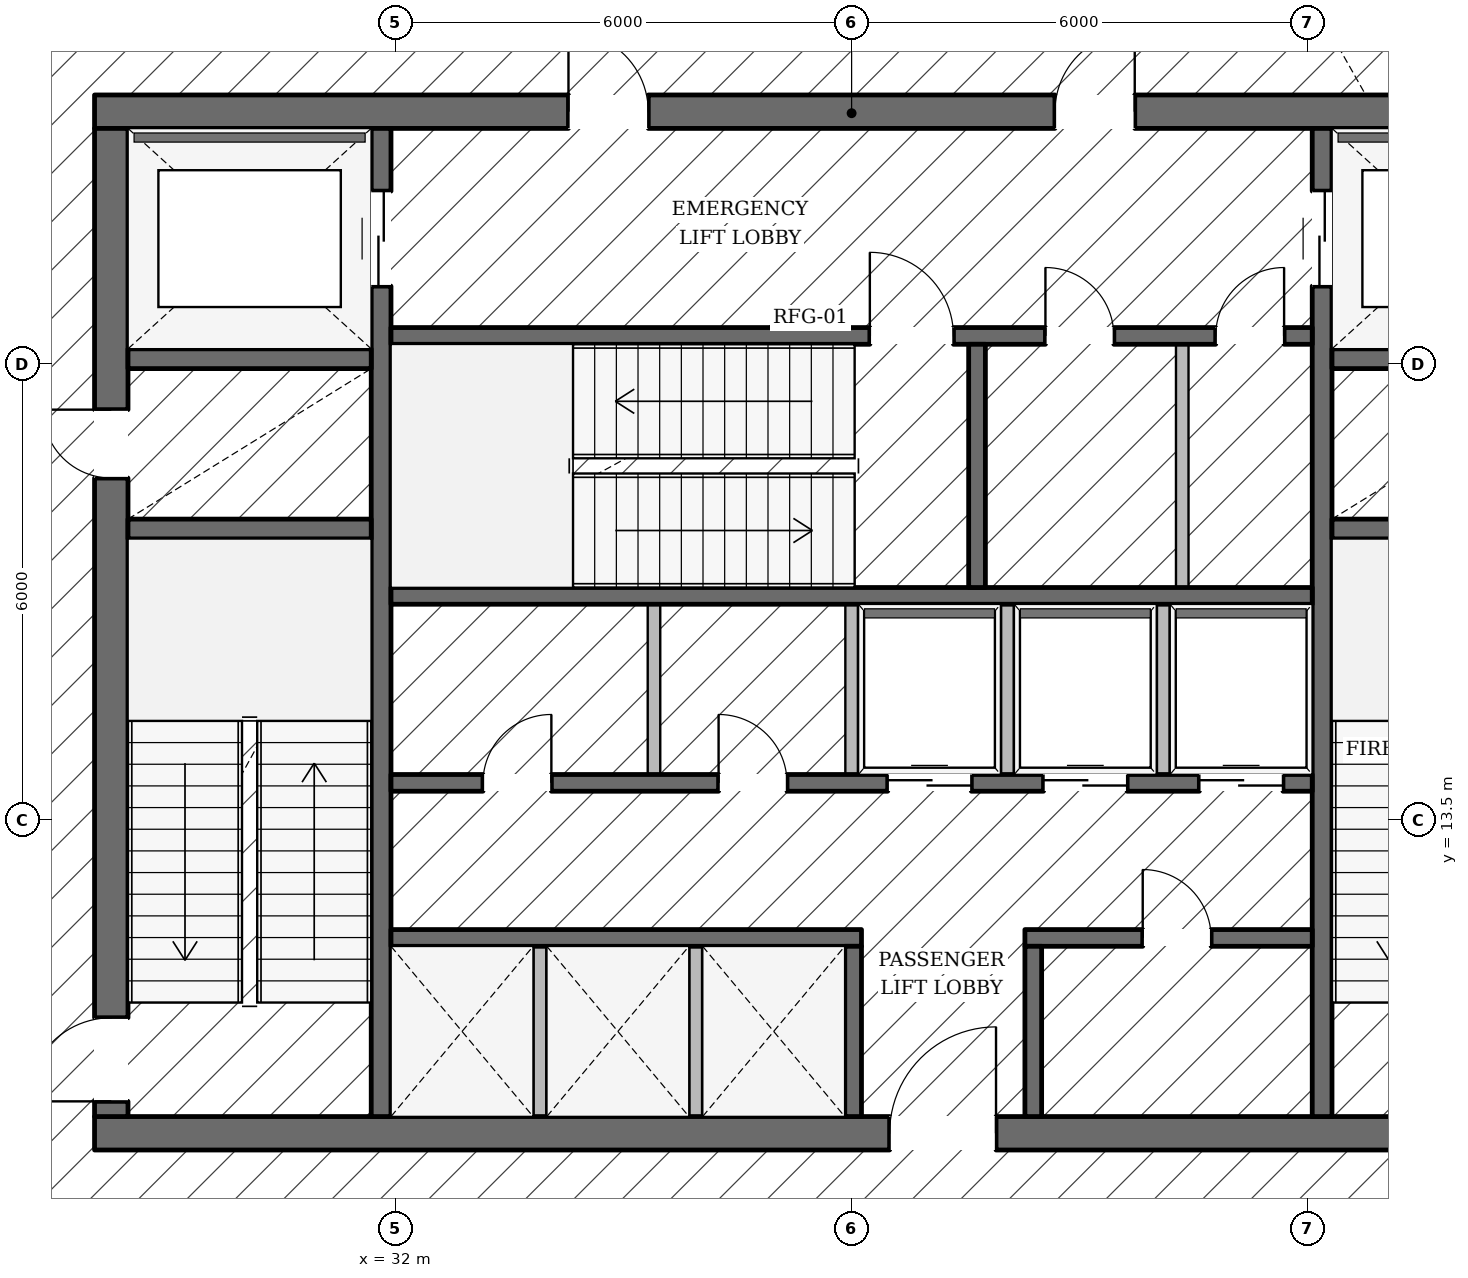
"""IFC4 building model, lengths in metres.
Left out: names, types, materials, properties, quantities, classifications, styles, units other than length and angle.
Written with IfcOpenShell. Run it as: python <this file> out.ifc"""

import sys

from ifc_helpers import new_model, si_unit, direction, frame, frame_2d, origin, place, context, subcontext, project, spatial, rectangle, extrude, element, fill, save


model = new_model("IFC4")
c1 = context("Model", 3, precision=1e-05, world=origin(), true_north=direction((0.0, 1.0)))
c2 = subcontext(c1, "Body", "Model", "MODEL_VIEW")
j1 = project(units=[si_unit("LENGTHUNIT", "METRE"), si_unit("PLANEANGLEUNIT", "RADIAN")], contexts=[c1])
p1 = place(None, origin())
s1 = spatial("IfcSite", under=j1, at=p1, CompositionType="ELEMENT")
p2 = place(p1, origin())
s2 = spatial("IfcBuilding", under=s1, at=p2, CompositionType="ELEMENT")
p3 = place(p2, frame((0.0, 0.0, 154.8)))
s3 = spatial("IfcBuildingStorey", under=s2, at=p3, CompositionType="ELEMENT", Elevation=154.8)
p4 = place(p3, frame((28.04, 9.38, 0.0), z_axis=(0.0, 0.0, 1.0), x_axis=(1.0, 0.0, 0.0)))
e1 = element("IfcWall", 1, at=p4, inside=s3, PredefinedType="SOLIDWALL", context=c2, shape_type="SweptSolid", body=[
    extrude(rectangle(XDim=19.92, YDim=0.44, at=frame_2d((9.96, 0.0))), origin(), (0.0, 0.0, 1.0), 4.985),
])
p5 = place(p4, frame((10.46, 0.0, 0.0)))
e2 = element("IfcOpeningElement", 2, at=p5, cuts=e1, PredefinedType="OPENING", context=c2, shape_type="SweptSolid", body=[
    extrude(rectangle(XDim=1.4, YDim=2.2, at=frame_2d((0.7, 1.1))), frame((0.0, 0.23, 0.0), z_axis=(0.0, -1.0, 0.0), x_axis=(1.0, 0.0, 0.0)), (0.0, 0.0, 1.0), 0.46),
])
p6 = place(p3, frame((28.04, 22.82, 0.0), z_axis=(0.0, 0.0, 1.0), x_axis=(1.0, 0.0, 0.0)))
e3 = element("IfcWall", 3, at=p6, inside=s3, PredefinedType="SOLIDWALL", context=c2, shape_type="SweptSolid", body=[
    extrude(rectangle(XDim=19.92, YDim=0.44, at=frame_2d((9.96, 0.0))), origin(), (0.0, 0.0, 1.0), 4.985),
])
p7 = place(p6, frame((6.235, 0.0, 0.0)))
e4 = element("IfcOpeningElement", 4, at=p7, cuts=e3, PredefinedType="OPENING", context=c2, shape_type="SweptSolid", body=[
    extrude(rectangle(XDim=1.05, YDim=2.15, at=frame_2d((0.525, 1.075))), frame((0.0, 0.23, 0.0), z_axis=(0.0, -1.0, 0.0), x_axis=(1.0, 0.0, 0.0)), (0.0, 0.0, 1.0), 0.46),
])
p8 = place(p6, frame((12.635, 0.0, 0.0)))
e5 = element("IfcOpeningElement", 5, at=p8, cuts=e3, PredefinedType="OPENING", context=c2, shape_type="SweptSolid", body=[
    extrude(rectangle(XDim=1.05, YDim=2.15, at=frame_2d((0.525, 1.075))), frame((0.0, 0.23, 0.0), z_axis=(0.0, -1.0, 0.0), x_axis=(1.0, 0.0, 0.0)), (0.0, 0.0, 1.0), 0.46),
])
p9 = place(p3, frame((28.26, 9.6, 0.0), z_axis=(0.0, 0.0, 1.0), x_axis=(0.0, 1.0, 0.0)))
e6 = element("IfcWall", 6, at=p9, inside=s3, PredefinedType="SOLIDWALL", context=c2, shape_type="SweptSolid", body=[
    extrude(rectangle(XDim=13.0, YDim=0.44, at=frame_2d((6.5, 0.0))), origin(), (0.0, 0.0, 1.0), 4.985),
])
p10 = place(p9, frame((0.2, 0.0, 0.0)))
e7 = element("IfcOpeningElement", 7, at=p10, cuts=e6, PredefinedType="OPENING", context=c2, shape_type="SweptSolid", body=[
    extrude(rectangle(XDim=1.1, YDim=2.15, at=frame_2d((0.55, 1.075))), frame((0.0, 0.23, 0.0), z_axis=(0.0, -1.0, 0.0), x_axis=(1.0, 0.0, 0.0)), (0.0, 0.0, 1.0), 0.46),
])
p11 = place(p9, frame((8.4, 0.0, 0.0)))
e8 = element("IfcOpeningElement", 8, at=p11, cuts=e6, PredefinedType="OPENING", context=c2, shape_type="SweptSolid", body=[
    extrude(rectangle(XDim=0.9, YDim=2.1, at=frame_2d((0.45, 1.05))), frame((0.0, 0.23, 0.0), z_axis=(0.0, -1.0, 0.0), x_axis=(1.0, 0.0, 0.0)), (0.0, 0.0, 1.0), 0.46),
])
p12 = place(p3, frame((31.81, 9.6, 0.0), z_axis=(0.0, 0.0, 1.0), x_axis=(0.0, 1.0, 0.0)))
e9 = element("IfcWall", 9, at=p12, inside=s3, PredefinedType="SHEAR", context=c2, shape_type="SweptSolid", body=[
    extrude(rectangle(XDim=13.0, YDim=0.26, at=frame_2d((6.5, 0.0))), origin(), (0.0, 0.0, 1.0), 4.985),
])
p13 = place(p12, frame((10.925, 0.0, 0.0)))
e10 = element("IfcOpeningElement", 10, at=p13, cuts=e9, PredefinedType="OPENING", context=c2, shape_type="SweptSolid", body=[
    extrude(rectangle(XDim=1.25, YDim=2.25, at=frame_2d((0.625, 1.125))), frame((0.0, 0.14, 0.0), z_axis=(0.0, -1.0, 0.0), x_axis=(1.0, 0.0, 0.0)), (0.0, 0.0, 1.0), 0.28),
])
p14 = place(p3, frame((44.19, 9.6, 0.0), z_axis=(0.0, 0.0, 1.0), x_axis=(0.0, 1.0, 0.0)))
e11 = element("IfcWall", 11, at=p14, inside=s3, PredefinedType="SHEAR", context=c2, shape_type="SweptSolid", body=[
    extrude(rectangle(XDim=13.0, YDim=0.26, at=frame_2d((6.5, 0.0))), origin(), (0.0, 0.0, 1.0), 4.985),
])
p15 = place(p14, frame((10.925, 0.0, 0.0)))
e12 = element("IfcOpeningElement", 12, at=p15, cuts=e11, PredefinedType="OPENING", context=c2, shape_type="SweptSolid", body=[
    extrude(rectangle(XDim=1.25, YDim=2.25, at=frame_2d((0.625, 1.125))), frame((0.0, 0.14, 0.0), z_axis=(0.0, -1.0, 0.0), x_axis=(1.0, 0.0, 0.0)), (0.0, 0.0, 1.0), 0.28),
])
for number, where, z_axis, x_axis in (
    (13, (28.48, 17.33, 0.0), (0.0, 0.0, 1.0), (1.0, 0.0, 0.0)),
    (14, (28.48, 19.57, 0.0), (0.0, 0.0, 1.0), (1.0, 0.0, 0.0)),
    (15, (44.32, 17.33, 0.0), (0.0, 0.0, 1.0), (1.0, 0.0, 0.0)),
    (16, (44.32, 19.57, 0.0), (0.0, 0.0, 1.0), (1.0, 0.0, 0.0)),
):
    element("IfcWall", number, at=place(p3, frame(where, z_axis=z_axis, x_axis=x_axis)), inside=s3, PredefinedType="SHEAR", context=c2, shape_type="SweptSolid", body=[
        extrude(rectangle(XDim=3.2, YDim=0.26, at=frame_2d((1.6, 0.0))), origin(), (0.0, 0.0, 1.0), 4.985),
    ])
p16 = place(p3, frame((31.94, 19.87, 0.0), z_axis=(0.0, 0.0, 1.0), x_axis=(1.0, 0.0, 0.0)))
e17 = element("IfcWall", 17, at=p16, inside=s3, PredefinedType="SOLIDWALL", context=c2, shape_type="SweptSolid", body=[
    extrude(rectangle(XDim=12.12, YDim=0.22, at=frame_2d((6.06, 0.0))), origin(), (0.0, 0.0, 1.0), 4.985),
])
p17 = place(p16, frame((6.3, 0.0, 0.0)))
e18 = element("IfcOpeningElement", 18, at=p17, cuts=e17, PredefinedType="OPENING", context=c2, shape_type="SweptSolid", body=[
    extrude(rectangle(XDim=1.1, YDim=2.15, at=frame_2d((0.55, 1.075))), frame((0.0, 0.12, 0.0), z_axis=(0.0, -1.0, 0.0), x_axis=(1.0, 0.0, 0.0)), (0.0, 0.0, 1.0), 0.24),
])
p18 = place(p16, frame((8.61, 0.0, 0.0)))
e19 = element("IfcOpeningElement", 19, at=p18, cuts=e17, PredefinedType="OPENING", context=c2, shape_type="SweptSolid", body=[
    extrude(rectangle(XDim=0.9, YDim=2.1, at=frame_2d((0.45, 1.05))), frame((0.0, 0.12, 0.0), z_axis=(0.0, -1.0, 0.0), x_axis=(1.0, 0.0, 0.0)), (0.0, 0.0, 1.0), 0.24),
])
p19 = place(p16, frame((10.85, 0.0, 0.0)))
e20 = element("IfcOpeningElement", 20, at=p19, cuts=e17, PredefinedType="OPENING", context=c2, shape_type="SweptSolid", body=[
    extrude(rectangle(XDim=0.9, YDim=2.1, at=frame_2d((0.45, 1.05))), frame((0.0, 0.12, 0.0), z_axis=(0.0, -1.0, 0.0), x_axis=(1.0, 0.0, 0.0)), (0.0, 0.0, 1.0), 0.24),
])
p20 = place(p3, frame((31.94, 16.45, 0.0), z_axis=(0.0, 0.0, 1.0), x_axis=(1.0, 0.0, 0.0)))
e21 = element("IfcWall", 21, at=p20, inside=s3, PredefinedType="SOLIDWALL", context=c2, shape_type="SweptSolid", body=[
    extrude(rectangle(XDim=12.12, YDim=0.22, at=frame_2d((6.06, 0.0))), origin(), (0.0, 0.0, 1.0), 4.985),
])
p21 = place(p3, frame((39.65, 16.56, 0.0), z_axis=(0.0, 0.0, 1.0), x_axis=(0.0, 1.0, 0.0)))
e22 = element("IfcWall", 22, at=p21, inside=s3, PredefinedType="SOLIDWALL", context=c2, shape_type="SweptSolid", body=[
    extrude(rectangle(XDim=3.2, YDim=0.22, at=frame_2d((1.6, 0.0))), origin(), (0.0, 0.0, 1.0), 4.985),
])
p22 = place(p3, frame((31.94, 13.99, 0.0), z_axis=(0.0, 0.0, 1.0), x_axis=(1.0, 0.0, 0.0)))
e23 = element("IfcWall", 23, at=p22, inside=s3, PredefinedType="SOLIDWALL", context=c2, shape_type="SweptSolid", body=[
    extrude(rectangle(XDim=12.12, YDim=0.22, at=frame_2d((6.06, 0.0))), origin(), (0.0, 0.0, 1.0), 4.985),
])
p23 = place(p22, frame((1.21, 0.0, 0.0)))
e24 = element("IfcOpeningElement", 24, at=p23, cuts=e23, PredefinedType="OPENING", context=c2, shape_type="SweptSolid", body=[
    extrude(rectangle(XDim=0.9, YDim=2.1, at=frame_2d((0.45, 1.05))), frame((0.0, 0.12, 0.0), z_axis=(0.0, -1.0, 0.0), x_axis=(1.0, 0.0, 0.0)), (0.0, 0.0, 1.0), 0.24),
])
p24 = place(p22, frame((4.31, 0.0, 0.0)))
e25 = element("IfcOpeningElement", 25, at=p24, cuts=e23, PredefinedType="OPENING", context=c2, shape_type="SweptSolid", body=[
    extrude(rectangle(XDim=0.9, YDim=2.1, at=frame_2d((0.45, 1.05))), frame((0.0, 0.12, 0.0), z_axis=(0.0, -1.0, 0.0), x_axis=(1.0, 0.0, 0.0)), (0.0, 0.0, 1.0), 0.24),
])
p25 = place(p22, frame((6.535, 0.0, 0.0)))
e26 = element("IfcOpeningElement", 26, at=p25, cuts=e23, PredefinedType="OPENING", context=c2, shape_type="SweptSolid", body=[
    extrude(rectangle(XDim=1.1, YDim=2.2, at=frame_2d((0.55, 1.1))), frame((0.0, 0.12, 0.0), z_axis=(0.0, -1.0, 0.0), x_axis=(1.0, 0.0, 0.0)), (0.0, 0.0, 1.0), 0.24),
])
p26 = place(p22, frame((8.585, 0.0, 0.0)))
e27 = element("IfcOpeningElement", 27, at=p26, cuts=e23, PredefinedType="OPENING", context=c2, shape_type="SweptSolid", body=[
    extrude(rectangle(XDim=1.1, YDim=2.2, at=frame_2d((0.55, 1.1))), frame((0.0, 0.12, 0.0), z_axis=(0.0, -1.0, 0.0), x_axis=(1.0, 0.0, 0.0)), (0.0, 0.0, 1.0), 0.24),
])
p27 = place(p22, frame((10.635, 0.0, 0.0)))
e28 = element("IfcOpeningElement", 28, at=p27, cuts=e23, PredefinedType="OPENING", context=c2, shape_type="SweptSolid", body=[
    extrude(rectangle(XDim=1.1, YDim=2.2, at=frame_2d((0.55, 1.1))), frame((0.0, 0.12, 0.0), z_axis=(0.0, -1.0, 0.0), x_axis=(1.0, 0.0, 0.0)), (0.0, 0.0, 1.0), 0.24),
])
p28 = place(p3, frame((31.94, 11.95, 0.0), z_axis=(0.0, 0.0, 1.0), x_axis=(1.0, 0.0, 0.0)))
e29 = element("IfcWall", 29, at=p28, inside=s3, PredefinedType="SOLIDWALL", context=c2, shape_type="SweptSolid", body=[
    extrude(rectangle(XDim=6.19, YDim=0.22, at=frame_2d((3.095, 0.0))), origin(), (0.0, 0.0, 1.0), 4.985),
])
p29 = place(p3, frame((40.28, 11.95, 0.0), z_axis=(0.0, 0.0, 1.0), x_axis=(1.0, 0.0, 0.0)))
e30 = element("IfcWall", 30, at=p29, inside=s3, PredefinedType="SOLIDWALL", context=c2, shape_type="SweptSolid", body=[
    extrude(rectangle(XDim=3.78, YDim=0.22, at=frame_2d((1.89, 0.0))), origin(), (0.0, 0.0, 1.0), 4.985),
])
p30 = place(p29, frame((1.55, 0.0, 0.0)))
e31 = element("IfcOpeningElement", 31, at=p30, cuts=e30, PredefinedType="OPENING", context=c2, shape_type="SweptSolid", body=[
    extrude(rectangle(XDim=0.9, YDim=2.1, at=frame_2d((0.45, 1.05))), frame((0.0, 0.12, 0.0), z_axis=(0.0, -1.0, 0.0), x_axis=(1.0, 0.0, 0.0)), (0.0, 0.0, 1.0), 0.24),
])
for number, where, z_axis, x_axis in (
    (32, (38.02, 9.6, 0.0), (0.0, 0.0, 1.0), (0.0, 1.0, 0.0)),
    (33, (40.39, 9.6, 0.0), (0.0, 0.0, 1.0), (0.0, 1.0, 0.0)),
):
    element("IfcWall", number, at=place(p3, frame(where, z_axis=z_axis, x_axis=x_axis)), inside=s3, PredefinedType="SOLIDWALL", context=c2, shape_type="SweptSolid", body=[
        extrude(rectangle(XDim=2.24, YDim=0.22, at=frame_2d((1.12, 0.0))), origin(), (0.0, 0.0, 1.0), 4.985),
    ])
p31 = place(p3, frame((14.686, 12.292, 0.0), z_axis=(0.0, 0.0, 1.0), x_axis=(0.498068556708, 0.867137655057, 0.0)))
e34 = element("IfcWall", 34, at=p31, inside=s3, PredefinedType="STANDARD", context=c2, shape_type="SweptSolid", body=[
    extrude(rectangle(XDim=36.888, YDim=0.32, at=frame_2d((18.444, 0.0))), origin(), (0.0, 0.0, 1.0), 3.677),
])
p32 = place(p3, frame((42.832, 44.344, 0.0), z_axis=(0.0, 0.0, 1.0), x_axis=(0.492716907926, -0.870189662455, 0.0)))
e35 = element("IfcWall", 35, at=p32, inside=s3, PredefinedType="STANDARD", context=c2, shape_type="SweptSolid", body=[
    extrude(rectangle(XDim=36.505, YDim=0.32, at=frame_2d((18.253, 0.0))), origin(), (0.0, 0.0, 1.0), 3.677),
])
p33 = place(p3, frame((32.566, 45.26, 0.0), z_axis=(0.0, 0.0, 1.0), x_axis=(-0.50091530354, -0.865496307721, 0.0)))
e36 = element("IfcWall", 36, at=p33, inside=s3, PredefinedType="PARAPET", context=c2, shape_type="SweptSolid", body=[
    extrude(rectangle(XDim=38.428, YDim=0.24, at=frame_2d((19.214, 0.0))), origin(), (0.0, 0.0, 1.0), 1.25),
])
p34 = place(p3, frame((62.043, 12.37, 0.0), z_axis=(0.0, 0.0, 1.0), x_axis=(-0.494365638539, 0.869254056897, 0.0)))
e37 = element("IfcWall", 37, at=p34, inside=s3, PredefinedType="PARAPET", context=c2, shape_type="SweptSolid", body=[
    extrude(rectangle(XDim=37.934, YDim=0.24, at=frame_2d((18.967, 0.0))), origin(), (0.0, 0.0, 1.0), 1.25),
])
for number, where, z_axis, x_axis in (
    (38, (33.9, 9.52, 0.0), (0.0, 0.0, 1.0), (0.0, 1.0, 0.0)),
    (39, (35.95, 9.52, 0.0), (0.0, 0.0, 1.0), (0.0, 1.0, 0.0)),
):
    element("IfcWall", number, at=place(p3, frame(where, z_axis=z_axis, x_axis=x_axis)), inside=s3, PredefinedType="PARTITIONING", context=c2, shape_type="SweptSolid", body=[
        extrude(rectangle(XDim=2.32, YDim=0.165, at=frame_2d((1.16, 0.0))), origin(), (0.0, 0.0, 1.0), 4.985),
    ])
for number, where, z_axis, x_axis in (
    (40, (38.0, 14.1, 0.0), (0.0, 0.0, 1.0), (0.0, 1.0, 0.0)),
    (41, (35.4, 14.1, 0.0), (0.0, 0.0, 1.0), (0.0, 1.0, 0.0)),
    (42, (40.05, 14.1, 0.0), (0.0, 0.0, 1.0), (0.0, 1.0, 0.0)),
    (43, (42.1, 14.1, 0.0), (0.0, 0.0, 1.0), (0.0, 1.0, 0.0)),
):
    element("IfcWall", number, at=place(p3, frame(where, z_axis=z_axis, x_axis=x_axis)), inside=s3, PredefinedType="PARTITIONING", context=c2, shape_type="SweptSolid", body=[
        extrude(rectangle(XDim=2.24, YDim=0.165, at=frame_2d((1.12, 0.0))), origin(), (0.0, 0.0, 1.0), 4.985),
    ])
p35 = place(p3, frame((42.35, 16.56, 0.0), z_axis=(0.0, 0.0, 1.0), x_axis=(0.0, 1.0, 0.0)))
e44 = element("IfcWall", 44, at=p35, inside=s3, PredefinedType="PARTITIONING", context=c2, shape_type="SweptSolid", body=[
    extrude(rectangle(XDim=3.2, YDim=0.165, at=frame_2d((1.6, 0.0))), origin(), (0.0, 0.0, 1.0), 4.985),
])
p36 = place(p10, origin())
e45 = element("IfcDoor", 45, at=p36, inside=s3, OperationType="SINGLE_SWING_LEFT", PredefinedType="DOOR", context=c2, shape_type="SweptSolid", body=[
    extrude(rectangle(XDim=1.1, YDim=2.15, at=frame_2d((0.55, 1.075))), frame((0.0, 0.025, 0.0), z_axis=(0.0, -1.0, 0.0), x_axis=(1.0, 0.0, 0.0)), (0.0, 0.0, 1.0), 0.05),
])
fill(e7, e45)
p37 = place(p17, origin())
e46 = element("IfcDoor", 46, at=p37, inside=s3, OperationType="SINGLE_SWING_LEFT", PredefinedType="DOOR", context=c2, shape_type="SweptSolid", body=[
    extrude(rectangle(XDim=1.1, YDim=2.15, at=frame_2d((0.55, 1.075))), frame((0.0, 0.025, 0.0), z_axis=(0.0, -1.0, 0.0), x_axis=(1.0, 0.0, 0.0)), (0.0, 0.0, 1.0), 0.05),
])
fill(e18, e46)
p38 = place(p11, origin())
e47 = element("IfcDoor", 47, at=p38, inside=s3, OperationType="SINGLE_SWING_RIGHT", PredefinedType="DOOR", context=c2, shape_type="SweptSolid", body=[
    extrude(rectangle(XDim=0.9, YDim=2.1, at=frame_2d((0.45, 1.05))), frame((0.0, 0.025, 0.0), z_axis=(0.0, -1.0, 0.0), x_axis=(1.0, 0.0, 0.0)), (0.0, 0.0, 1.0), 0.05),
])
fill(e8, e47)
p39 = place(p7, origin())
e48 = element("IfcDoor", 48, at=p39, inside=s3, OperationType="SINGLE_SWING_LEFT", PredefinedType="DOOR", context=c2, shape_type="SweptSolid", body=[
    extrude(rectangle(XDim=1.05, YDim=2.15, at=frame_2d((0.525, 1.075))), frame((0.0, 0.025, 0.0), z_axis=(0.0, -1.0, 0.0), x_axis=(1.0, 0.0, 0.0)), (0.0, 0.0, 1.0), 0.05),
])
fill(e4, e48)
p40 = place(p8, origin())
e49 = element("IfcDoor", 49, at=p40, inside=s3, OperationType="SINGLE_SWING_RIGHT", PredefinedType="DOOR", context=c2, shape_type="SweptSolid", body=[
    extrude(rectangle(XDim=1.05, YDim=2.15, at=frame_2d((0.525, 1.075))), frame((0.0, 0.025, 0.0), z_axis=(0.0, -1.0, 0.0), x_axis=(1.0, 0.0, 0.0)), (0.0, 0.0, 1.0), 0.05),
])
fill(e5, e49)
p41 = place(p13, origin())
e50 = element("IfcDoor", 50, at=p41, inside=s3, OperationType="DOUBLE_DOOR_SLIDING", PredefinedType="DOOR", context=c2, shape_type="SweptSolid", body=[
    extrude(rectangle(XDim=1.25, YDim=2.25, at=frame_2d((0.625, 1.125))), frame((0.0, 0.025, 0.0), z_axis=(0.0, -1.0, 0.0), x_axis=(1.0, 0.0, 0.0)), (0.0, 0.0, 1.0), 0.05),
])
fill(e10, e50)
p42 = place(p15, origin())
e51 = element("IfcDoor", 51, at=p42, inside=s3, OperationType="DOUBLE_DOOR_SLIDING", PredefinedType="DOOR", context=c2, shape_type="SweptSolid", body=[
    extrude(rectangle(XDim=1.25, YDim=2.25, at=frame_2d((0.625, 1.125))), frame((0.0, 0.025, 0.0), z_axis=(0.0, -1.0, 0.0), x_axis=(1.0, 0.0, 0.0)), (0.0, 0.0, 1.0), 0.05),
])
fill(e12, e51)
p43 = place(p5, origin())
e52 = element("IfcDoor", 52, at=p43, inside=s3, OperationType="SINGLE_SWING_RIGHT", PredefinedType="DOOR", context=c2, shape_type="SweptSolid", body=[
    extrude(rectangle(XDim=1.4, YDim=2.2, at=frame_2d((0.7, 1.1))), frame((0.0, 0.025, 0.0), z_axis=(0.0, -1.0, 0.0), x_axis=(1.0, 0.0, 0.0)), (0.0, 0.0, 1.0), 0.05),
])
fill(e2, e52)
p44 = place(p23, origin())
e53 = element("IfcDoor", 53, at=p44, inside=s3, OperationType="SINGLE_SWING_RIGHT", PredefinedType="DOOR", context=c2, shape_type="SweptSolid", body=[
    extrude(rectangle(XDim=0.9, YDim=2.1, at=frame_2d((0.45, 1.05))), frame((0.0, 0.025, 0.0), z_axis=(0.0, -1.0, 0.0), x_axis=(1.0, 0.0, 0.0)), (0.0, 0.0, 1.0), 0.05),
])
fill(e24, e53)
p45 = place(p24, origin())
e54 = element("IfcDoor", 54, at=p45, inside=s3, OperationType="SINGLE_SWING_LEFT", PredefinedType="DOOR", context=c2, shape_type="SweptSolid", body=[
    extrude(rectangle(XDim=0.9, YDim=2.1, at=frame_2d((0.45, 1.05))), frame((0.0, 0.025, 0.0), z_axis=(0.0, -1.0, 0.0), x_axis=(1.0, 0.0, 0.0)), (0.0, 0.0, 1.0), 0.05),
])
fill(e25, e54)
p46 = place(p25, origin())
e55 = element("IfcDoor", 55, at=p46, inside=s3, OperationType="DOUBLE_DOOR_SLIDING", PredefinedType="DOOR", context=c2, shape_type="SweptSolid", body=[
    extrude(rectangle(XDim=1.1, YDim=2.2, at=frame_2d((0.55, 1.1))), frame((0.0, 0.025, 0.0), z_axis=(0.0, -1.0, 0.0), x_axis=(1.0, 0.0, 0.0)), (0.0, 0.0, 1.0), 0.05),
])
fill(e26, e55)
p47 = place(p26, origin())
e56 = element("IfcDoor", 56, at=p47, inside=s3, OperationType="DOUBLE_DOOR_SLIDING", PredefinedType="DOOR", context=c2, shape_type="SweptSolid", body=[
    extrude(rectangle(XDim=1.1, YDim=2.2, at=frame_2d((0.55, 1.1))), frame((0.0, 0.025, 0.0), z_axis=(0.0, -1.0, 0.0), x_axis=(1.0, 0.0, 0.0)), (0.0, 0.0, 1.0), 0.05),
])
fill(e27, e56)
p48 = place(p27, origin())
e57 = element("IfcDoor", 57, at=p48, inside=s3, OperationType="DOUBLE_DOOR_SLIDING", PredefinedType="DOOR", context=c2, shape_type="SweptSolid", body=[
    extrude(rectangle(XDim=1.1, YDim=2.2, at=frame_2d((0.55, 1.1))), frame((0.0, 0.025, 0.0), z_axis=(0.0, -1.0, 0.0), x_axis=(1.0, 0.0, 0.0)), (0.0, 0.0, 1.0), 0.05),
])
fill(e28, e57)
p49 = place(p18, origin())
e58 = element("IfcDoor", 58, at=p49, inside=s3, OperationType="SINGLE_SWING_LEFT", PredefinedType="DOOR", context=c2, shape_type="SweptSolid", body=[
    extrude(rectangle(XDim=0.9, YDim=2.1, at=frame_2d((0.45, 1.05))), frame((0.0, 0.025, 0.0), z_axis=(0.0, -1.0, 0.0), x_axis=(1.0, 0.0, 0.0)), (0.0, 0.0, 1.0), 0.05),
])
fill(e19, e58)
p50 = place(p19, origin())
e59 = element("IfcDoor", 59, at=p50, inside=s3, OperationType="SINGLE_SWING_RIGHT", PredefinedType="DOOR", context=c2, shape_type="SweptSolid", body=[
    extrude(rectangle(XDim=0.9, YDim=2.1, at=frame_2d((0.45, 1.05))), frame((0.0, 0.025, 0.0), z_axis=(0.0, -1.0, 0.0), x_axis=(1.0, 0.0, 0.0)), (0.0, 0.0, 1.0), 0.05),
])
fill(e20, e59)
p51 = place(p30, origin())
e60 = element("IfcDoor", 60, at=p51, inside=s3, OperationType="SINGLE_SWING_LEFT", PredefinedType="DOOR", context=c2, shape_type="SweptSolid", body=[
    extrude(rectangle(XDim=0.9, YDim=2.1, at=frame_2d((0.45, 1.05))), frame((0.0, 0.025, 0.0), z_axis=(0.0, -1.0, 0.0), x_axis=(1.0, 0.0, 0.0)), (0.0, 0.0, 1.0), 0.05),
])
fill(e31, e60)
save(model, sys.argv[1])
